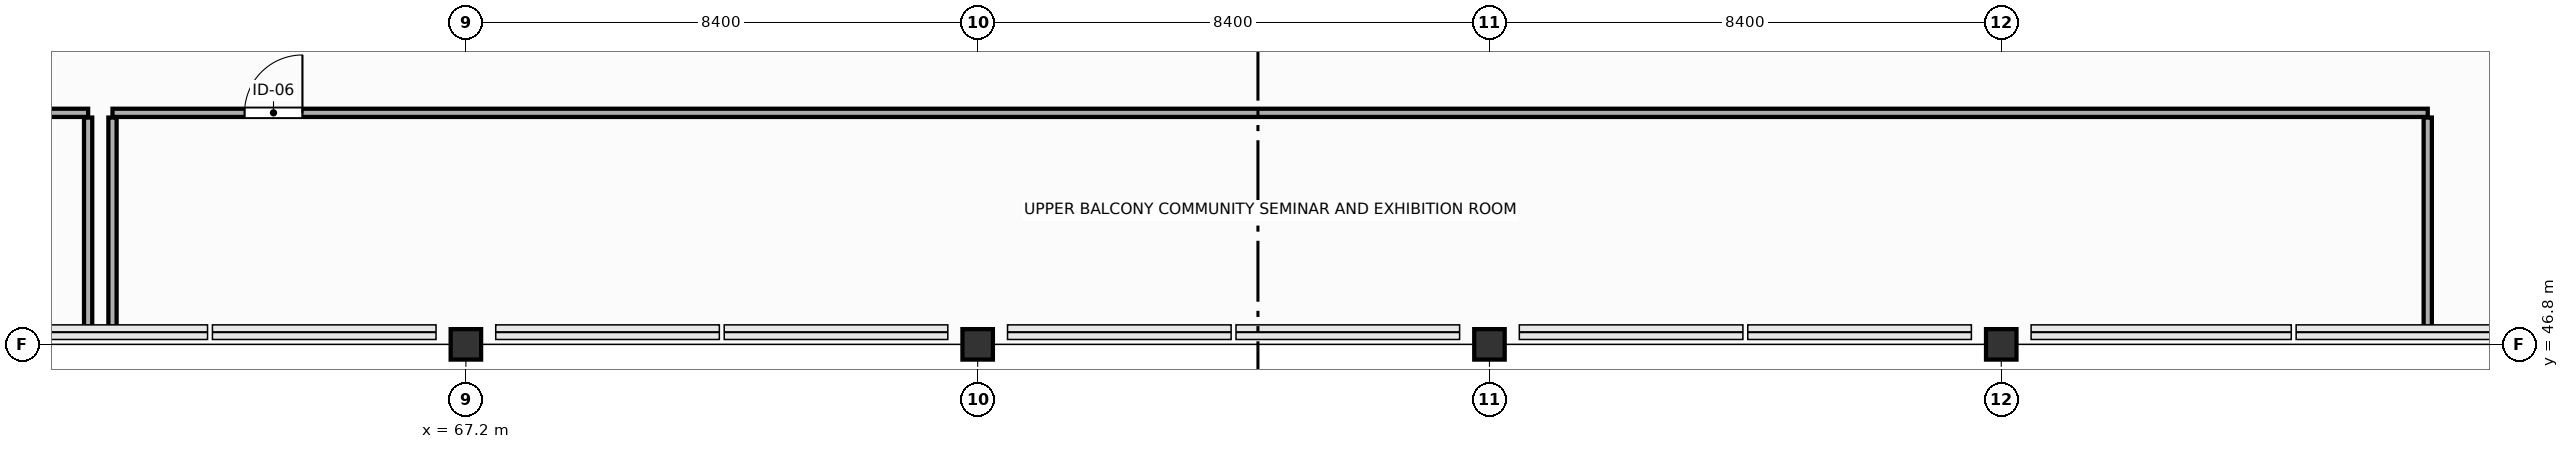
"""IFC4 building model, lengths in metres.
Left out: names, types, materials, properties, quantities, classifications, styles, units other than length and angle.
Written with IfcOpenShell. Run it as: python <this file> out.ifc"""

import sys

from ifc_helpers import new_model, si_unit, direction, frame, frame_2d, origin, origin_2d, place, context, subcontext, project, spatial, rectangle, extrude, element, fill, save


model = new_model("IFC4")
c1 = context("Model", 3, precision=1e-05, world=origin(), true_north=direction((0.0, 1.0)))
c2 = subcontext(c1, "Body", "Model", "MODEL_VIEW")
j1 = project(units=[si_unit("LENGTHUNIT", "METRE"), si_unit("PLANEANGLEUNIT", "RADIAN")], contexts=[c1])
p1 = place(None, origin())
s1 = spatial("IfcSite", under=j1, at=p1, CompositionType="ELEMENT")
p2 = place(p1, origin())
s2 = spatial("IfcBuilding", under=s1, at=p2, CompositionType="ELEMENT")
p3 = place(p2, frame((0.0, 0.0, 9.9)))
s3 = spatial("IfcBuildingStorey", under=s2, at=p3, CompositionType="ELEMENT", Elevation=9.9)
for number, where, z_axis, x_axis in (
    (1, (67.2, 46.8, 0.0), (0.0, 0.0, 1.0), (1.0, 0.0, 0.0)),
    (2, (75.6, 46.8, 0.0), (0.0, 0.0, 1.0), (1.0, 0.0, 0.0)),
    (3, (84.0, 46.8, 0.0), (0.0, 0.0, 1.0), (1.0, 0.0, 0.0)),
    (4, (92.4, 46.8, 0.0), (0.0, 0.0, 1.0), (1.0, 0.0, 0.0)),
):
    element("IfcColumn", number, at=place(p3, frame(where, z_axis=z_axis, x_axis=x_axis)), inside=s3, PredefinedType="COLUMN", context=c2, shape_type="SweptSolid", body=[
        extrude(rectangle(XDim=0.5, YDim=0.5, at=origin_2d()), origin(), (0.0, 0.0, 1.0), 4.5),
    ])
p4 = place(p3, frame((46.8, 50.6, 0.0), z_axis=(0.0, 0.0, 1.0), x_axis=(1.0, 0.0, 0.0)))
e5 = element("IfcWall", 5, at=p4, inside=s3, PredefinedType="PARTITIONING", context=c2, shape_type="SweptSolid", body=[
    extrude(rectangle(XDim=14.2, YDim=0.135, at=frame_2d((7.1, 0.0))), origin(), (0.0, 0.0, 1.0), 3.28),
])
p5 = place(p4, frame((2.232, 0.0, 0.0)))
e6 = element("IfcOpeningElement", 6, at=p5, cuts=e5, PredefinedType="OPENING", context=c2, shape_type="SweptSolid", body=[
    extrude(rectangle(XDim=0.95, YDim=2.15, at=frame_2d((0.475, 1.075))), frame((0.0, 0.077, 0.0), z_axis=(0.0, -1.0, 0.0), x_axis=(1.0, 0.0, 0.0)), (0.0, 0.0, 1.0), 0.155),
])
p6 = place(p3, frame((61.0, 50.522, 0.0), z_axis=(0.0, 0.0, 1.0), x_axis=(0.0, -1.0, 0.0)))
e7 = element("IfcWall", 7, at=p6, inside=s3, PredefinedType="PARTITIONING", context=c2, shape_type="SweptSolid", body=[
    extrude(rectangle(XDim=3.432, YDim=0.135, at=frame_2d((1.716, 0.0))), origin(), (0.0, 0.0, 1.0), 3.63),
])
p7 = place(p3, frame((61.4, 50.6, 0.0), z_axis=(0.0, 0.0, 1.0), x_axis=(1.0, 0.0, 0.0)))
e8 = element("IfcWall", 8, at=p7, inside=s3, PredefinedType="PARTITIONING", context=c2, shape_type="SweptSolid", body=[
    extrude(rectangle(XDim=38.0, YDim=0.135, at=frame_2d((19.0, 0.0))), origin(), (0.0, 0.0, 1.0), 3.28),
])
p8 = place(p7, frame((2.167, 0.0, 0.0)))
e9 = element("IfcOpeningElement", 9, at=p8, cuts=e8, PredefinedType="OPENING", context=c2, shape_type="SweptSolid", body=[
    extrude(rectangle(XDim=0.95, YDim=2.15, at=frame_2d((0.475, 1.075))), frame((0.0, 0.077, 0.0), z_axis=(0.0, -1.0, 0.0), x_axis=(1.0, 0.0, 0.0)), (0.0, 0.0, 1.0), 0.155),
])
p9 = place(p3, frame((61.4, 47.09, 0.0), z_axis=(0.0, 0.0, 1.0), x_axis=(0.0, 1.0, 0.0)))
e10 = element("IfcWall", 10, at=p9, inside=s3, PredefinedType="PARTITIONING", context=c2, shape_type="SweptSolid", body=[
    extrude(rectangle(XDim=3.432, YDim=0.135, at=frame_2d((1.716, 0.0))), origin(), (0.0, 0.0, 1.0), 3.63),
])
p10 = place(p3, frame((99.4, 50.522, 0.0), z_axis=(0.0, 0.0, 1.0), x_axis=(0.0, -1.0, 0.0)))
e11 = element("IfcWall", 11, at=p10, inside=s3, PredefinedType="PARTITIONING", context=c2, shape_type="SweptSolid", body=[
    extrude(rectangle(XDim=3.432, YDim=0.135, at=frame_2d((1.716, 0.0))), origin(), (0.0, 0.0, 1.0), 3.58),
])
p11 = place(p8, origin())
e12 = element("IfcDoor", 12, at=p11, inside=s3, OperationType="SINGLE_SWING_RIGHT", PredefinedType="DOOR", context=c2, shape_type="SweptSolid", body=[
    extrude(rectangle(XDim=0.95, YDim=2.15, at=frame_2d((0.475, 1.075))), frame((0.0, 0.025, 0.0), z_axis=(0.0, -1.0, 0.0), x_axis=(1.0, 0.0, 0.0)), (0.0, 0.0, 1.0), 0.05),
])
fill(e9, e12)
save(model, sys.argv[1])
